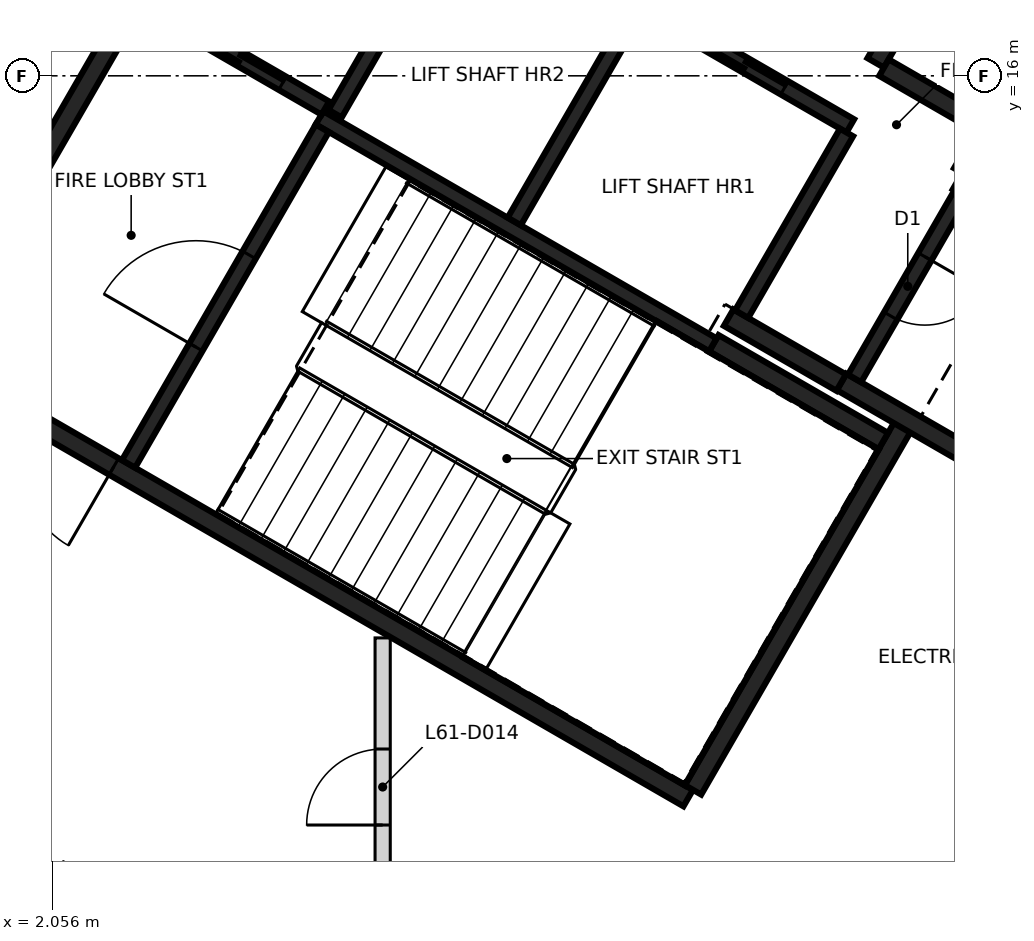
"""IFC4 building model, lengths in metres.
Left out: names, types, materials, properties, quantities, classifications, styles, units other than length and angle.
Written with IfcOpenShell. Run it as: python <this file> out.ifc"""

import sys

from ifc_helpers import new_model, si_unit, direction, frame, frame_2d, origin, place, context, subcontext, project, spatial, rectangle, extrude, element, fill, save


model = new_model("IFC4")
c1 = context("Model", 3, precision=1e-05, world=origin(), true_north=direction((0.0, 1.0)))
c2 = subcontext(c1, "Body", "Model", "MODEL_VIEW")
j1 = project(units=[si_unit("LENGTHUNIT", "METRE"), si_unit("PLANEANGLEUNIT", "RADIAN")], contexts=[c1])
p1 = place(None, origin())
s1 = spatial("IfcSite", under=j1, at=p1, CompositionType="ELEMENT")
p2 = place(p1, origin())
s2 = spatial("IfcBuilding", under=s1, at=p2, CompositionType="ELEMENT")
p3 = place(p2, frame((0.0, 0.0, 243.0)))
s3 = spatial("IfcBuildingStorey", under=s2, at=p3, CompositionType="ELEMENT", Elevation=243.0)
p4 = place(p3, frame((10.42, 6.498, 0.0), z_axis=(0.0, 0.0, 1.0), x_axis=(-0.866021906294, 0.500006057782, 0.0)))
e1 = element("IfcWall", 1, at=p4, inside=s3, PredefinedType="SHEAR", context=c2, shape_type="SweptSolid", body=[
    extrude(rectangle(XDim=11.55, YDim=0.25, at=frame_2d((5.775, 0.0))), origin(), (0.0, 0.0, 1.0), 3.25),
])
p5 = place(p4, frame((10.025, 0.0, 0.0)))
e2 = element("IfcOpeningElement", 2, at=p5, cuts=e1, PredefinedType="OPENING", context=c2, shape_type="SweptSolid", body=[
    extrude(rectangle(XDim=1.2, YDim=2.1, at=frame_2d((0.6, 1.05))), frame((0.0, 0.135, 0.0), z_axis=(0.0, -1.0, 0.0), x_axis=(1.0, 0.0, 0.0)), (0.0, 0.0, 1.0), 0.27),
])
p6 = place(p4, frame((8.725, 0.0, 0.0)))
e3 = element("IfcOpeningElement", 3, at=p6, cuts=e1, PredefinedType="OPENING", context=c2, shape_type="SweptSolid", body=[
    extrude(rectangle(XDim=1.2, YDim=2.1, at=frame_2d((0.6, 1.05))), frame((0.0, 0.135, 0.0), z_axis=(0.0, -1.0, 0.0), x_axis=(1.0, 0.0, 0.0)), (0.0, 0.0, 1.0), 0.27),
])
p7 = place(p3, frame((0.48, 12.381, 0.0), z_axis=(0.0, 0.0, 1.0), x_axis=(0.49999885962, 0.866026062182, 0.0)))
e4 = element("IfcWall", 4, at=p7, inside=s3, PredefinedType="SHEAR", context=c2, shape_type="SweptSolid", body=[
    extrude(rectangle(XDim=5.225, YDim=0.25, at=frame_2d((2.612, 0.0))), origin(), (0.0, 0.0, 1.0), 3.25),
])
p8 = place(p3, frame((13.238, 11.378, 0.0), z_axis=(0.0, 0.0, 1.0), x_axis=(-0.500008851346, -0.866020293397, 0.0)))
e5 = element("IfcWall", 5, at=p8, inside=s3, PredefinedType="SHEAR", context=c2, shape_type="SweptSolid", body=[
    extrude(rectangle(XDim=5.51, YDim=0.25, at=frame_2d((2.755, 0.0))), origin(), (0.0, 0.0, 1.0), 3.25),
])
p9 = place(p3, frame((14.918, 10.54, 0.0), z_axis=(0.0, 0.0, 1.0), x_axis=(-0.866063538972, 0.499933942099, 0.0)))
e6 = element("IfcWall", 6, at=p9, inside=s3, PredefinedType="SHEAR", context=c2, shape_type="SweptSolid", body=[
    extrude(rectangle(XDim=2.865, YDim=0.25, at=frame_2d((1.432, 0.0))), origin(), (0.0, 0.0, 1.0), 3.25),
])
p10 = place(p3, frame((13.963, 14.614, 0.0), z_axis=(0.0, 0.0, 1.0), x_axis=(0.866042235819, -0.499970844928, 0.0)))
e7 = element("IfcWall", 7, at=p10, inside=s3, PredefinedType="SHEAR", context=c2, shape_type="SweptSolid", body=[
    extrude(rectangle(XDim=2.865, YDim=0.25, at=frame_2d((1.432, 0.0))), origin(), (0.0, 0.0, 1.0), 3.25),
])
p11 = place(p3, frame((10.757, 12.481, 0.0), z_axis=(0.0, 0.0, 1.0), x_axis=(0.866022940537, -0.500004266446, 0.0)))
e8 = element("IfcWall", 8, at=p11, inside=s3, PredefinedType="SHEAR", context=c2, shape_type="SweptSolid", body=[
    extrude(rectangle(XDim=2.575, YDim=0.25, at=frame_2d((1.287, 0.0))), origin(), (0.0, 0.0, 1.0), 3.25),
])
p12 = place(p3, frame((13.819, 17.785, 0.0), z_axis=(0.0, 0.0, 1.0), x_axis=(-0.500039802285, -0.866002422705, 0.0)))
e9 = element("IfcWall", 9, at=p12, inside=s3, PredefinedType="SHEAR", context=c2, shape_type="SweptSolid", body=[
    extrude(rectangle(XDim=1.865, YDim=0.25, at=frame_2d((0.932, 0.0))), origin(), (0.0, 0.0, 1.0), 3.25),
])
p13 = place(p3, frame((12.433, 11.964, 0.0), z_axis=(0.0, 0.0, 1.0), x_axis=(-0.866038183914, 0.499977863513, 0.0)))
e10 = element("IfcWall", 10, at=p13, inside=s3, PredefinedType="SHEAR", context=c2, shape_type="SweptSolid", body=[
    extrude(rectangle(XDim=1.71, YDim=0.25, at=frame_2d((0.855, 0.0))), origin(), (0.0, 0.0, 1.0), 3.25),
])
p14 = place(p3, frame((12.995, 16.108, 0.0), z_axis=(0.0, 0.0, 1.0), x_axis=(0.866044474677, -0.49996696679, 0.0)))
e11 = element("IfcWall", 11, at=p14, inside=s3, PredefinedType="SHEAR", context=c2, shape_type="SweptSolid", body=[
    extrude(rectangle(XDim=1.584, YDim=0.25, at=frame_2d((0.792, 0.0))), origin(), (0.0, 0.0, 1.0), 3.25),
])
p15 = place(p3, frame((14.305, 15.207, 0.0), z_axis=(0.0, 0.0, 1.0), x_axis=(-0.499848422343, -0.866112899501, 0.0)))
e12 = element("IfcWall", 12, at=p15, inside=s3, PredefinedType="SHEAR", context=c2, shape_type="SweptSolid", body=[
    extrude(rectangle(XDim=0.559, YDim=0.25, at=frame_2d((0.28, 0.0))), origin(), (0.0, 0.0, 1.0), 3.25),
])
p16 = place(p3, frame((12.552, 15.342, 0.0), z_axis=(0.0, 0.0, 1.0), x_axis=(-0.866030299012, 0.499991521122, 0.0)))
e13 = element("IfcWall", 13, at=p16, inside=s3, PredefinedType="SHEAR", context=c2, shape_type="SweptSolid", body=[
    extrude(rectangle(XDim=6.1, YDim=0.2, at=frame_2d((3.05, 0.0))), origin(), (0.0, 0.0, 1.0), 3.25),
])
p17 = place(p16, frame((1.0, 0.0, 0.0)))
e14 = element("IfcOpeningElement", 14, at=p17, cuts=e13, PredefinedType="OPENING", context=c2, shape_type="SweptSolid", body=[
    extrude(rectangle(XDim=1.2, YDim=2.1, at=frame_2d((0.6, 1.05))), frame((0.0, 0.11, 0.0), z_axis=(0.0, -1.0, 0.0), x_axis=(1.0, 0.0, 0.0)), (0.0, 0.0, 1.0), 0.22),
])
p18 = place(p16, frame((3.982, 0.0, 0.0)))
e15 = element("IfcOpeningElement", 15, at=p18, cuts=e13, PredefinedType="OPENING", context=c2, shape_type="SweptSolid", body=[
    extrude(rectangle(XDim=1.2, YDim=2.1, at=frame_2d((0.6, 1.05))), frame((0.0, 0.11, 0.0), z_axis=(0.0, -1.0, 0.0), x_axis=(1.0, 0.0, 0.0)), (0.0, 0.0, 1.0), 0.22),
])
p19 = place(p3, frame((10.743, 12.46, 0.0), z_axis=(0.0, 0.0, 1.0), x_axis=(-0.866018848283, 0.500011354289, 0.0)))
e16 = element("IfcWall", 16, at=p19, inside=s3, PredefinedType="SHEAR", context=c2, shape_type="SweptSolid", body=[
    extrude(rectangle(XDim=5.974, YDim=0.2, at=frame_2d((2.987, 0.0))), origin(), (0.0, 0.0, 1.0), 3.25),
])
p20 = place(p3, frame((3.057, 10.895, 0.0), z_axis=(0.0, 0.0, 1.0), x_axis=(0.500027839223, 0.866009330205, 0.0)))
e17 = element("IfcWall", 17, at=p20, inside=s3, PredefinedType="SHEAR", context=c2, shape_type="SweptSolid", body=[
    extrude(rectangle(XDim=5.098, YDim=0.2, at=frame_2d((2.549, 0.0))), origin(), (0.0, 0.0, 1.0), 3.25),
])
p21 = place(p20, frame((1.774, 0.0, 0.0)))
e18 = element("IfcOpeningElement", 18, at=p21, cuts=e17, PredefinedType="OPENING", context=c2, shape_type="SweptSolid", body=[
    extrude(rectangle(XDim=1.4, YDim=2.1, at=frame_2d((0.7, 1.05))), frame((0.0, 0.11, 0.0), z_axis=(0.0, -1.0, 0.0), x_axis=(1.0, 0.0, 0.0)), (0.0, 0.0, 1.0), 0.22),
])
p22 = place(p3, frame((8.132, 14.084, 0.0), z_axis=(0.0, 0.0, 1.0), x_axis=(0.500030834389, 0.86600760081, 0.0)))
e19 = element("IfcWall", 19, at=p22, inside=s3, PredefinedType="SHEAR", context=c2, shape_type="SweptSolid", body=[
    extrude(rectangle(XDim=3.198, YDim=0.2, at=frame_2d((1.599, 0.0))), origin(), (0.0, 0.0, 1.0), 3.25),
])
p23 = place(p3, frame((14.008, 14.442, 0.0), z_axis=(0.0, 0.0, 1.0), x_axis=(-0.499986818241, -0.866033014143, 0.0)))
e20 = element("IfcWall", 20, at=p23, inside=s3, PredefinedType="SHEAR", context=c2, shape_type="SweptSolid", body=[
    extrude(rectangle(XDim=2.798, YDim=0.2, at=frame_2d((1.399, 0.0))), origin(), (0.0, 0.0, 1.0), 3.25),
])
p24 = place(p23, frame((0.949, 0.0, 0.0)))
e21 = element("IfcOpeningElement", 21, at=p24, cuts=e20, PredefinedType="OPENING", context=c2, shape_type="SweptSolid", body=[
    extrude(rectangle(XDim=0.9, YDim=2.1, at=frame_2d((0.45, 1.05))), frame((0.0, 0.11, 0.0), z_axis=(0.0, -1.0, 0.0), x_axis=(1.0, 0.0, 0.0)), (0.0, 0.0, 1.0), 0.22),
])
p25 = place(p3, frame((12.502, 15.255, 0.0), z_axis=(0.0, 0.0, 1.0), x_axis=(-0.499965018551, -0.866045599391, 0.0)))
e22 = element("IfcWall", 22, at=p25, inside=s3, PredefinedType="SHEAR", context=c2, shape_type="SweptSolid", body=[
    extrude(rectangle(XDim=2.759, YDim=0.2, at=frame_2d((1.379, 0.0))), origin(), (0.0, 0.0, 1.0), 3.25),
])
p26 = place(p3, frame((7.324, 18.187, 0.0), z_axis=(0.0, 0.0, 1.0), x_axis=(-0.499967891604, -0.866043940782, 0.0)))
e23 = element("IfcWall", 23, at=p26, inside=s3, PredefinedType="SHEAR", context=c2, shape_type="SweptSolid", body=[
    extrude(rectangle(XDim=3.1, YDim=0.2, at=frame_2d((1.55, 0.0))), origin(), (0.0, 0.0, 1.0), 3.25),
])
p27 = place(p3, frame((5.646, 15.576, 0.0), z_axis=(0.0, 0.0, 1.0), x_axis=(-0.866018407898, 0.500012117035, 0.0)))
e24 = element("IfcWall", 24, at=p27, inside=s3, PredefinedType="SHEAR", context=c2, shape_type="SweptSolid", body=[
    extrude(rectangle(XDim=2.651, YDim=0.2, at=frame_2d((1.325, 0.0))), origin(), (0.0, 0.0, 1.0), 3.25),
])
p28 = place(p27, frame((0.652, 0.0, 0.0)))
e25 = element("IfcOpeningElement", 25, at=p28, cuts=e24, PredefinedType="OPENING", context=c2, shape_type="SweptSolid", body=[
    extrude(rectangle(XDim=1.3, YDim=2.1, at=frame_2d((0.65, 1.05))), frame((0.0, 0.11, 0.0), z_axis=(0.0, -1.0, 0.0), x_axis=(1.0, 0.0, 0.0)), (0.0, 0.0, 1.0), 0.22),
])
p29 = place(p3, frame((-1.086, 12.651, 0.0), z_axis=(0.0, 0.0, 1.0), x_axis=(0.492590234691, 0.870261374925, 0.0)))
e26 = element("IfcWall", 26, at=p29, inside=s3, PredefinedType="PARTITIONING", context=c2, shape_type="SweptSolid", body=[
    extrude(rectangle(XDim=8.738, YDim=0.2, at=frame_2d((4.369, 0.0))), origin(), (0.0, 0.0, 1.0), 3.25),
])
p30 = place(p29, frame((6.105, 0.0, 0.0)))
e27 = element("IfcOpeningElement", 27, at=p30, cuts=e26, PredefinedType="OPENING", context=c2, shape_type="SweptSolid", body=[
    extrude(rectangle(XDim=1.0, YDim=2.1, at=frame_2d((0.5, 1.05))), frame((0.0, 0.11, 0.0), z_axis=(0.0, -1.0, 0.0), x_axis=(1.0, 0.0, 0.0)), (0.0, 0.0, 1.0), 0.22),
])
p31 = place(p29, frame((3.25, 0.0, 0.0)))
e28 = element("IfcOpeningElement", 28, at=p31, cuts=e26, PredefinedType="OPENING", context=c2, shape_type="SweptSolid", body=[
    extrude(rectangle(XDim=0.95, YDim=2.1, at=frame_2d((0.475, 1.05))), frame((0.0, 0.11, 0.0), z_axis=(0.0, -1.0, 0.0), x_axis=(1.0, 0.0, 0.0)), (0.0, 0.0, 1.0), 0.22),
])
p32 = place(p3, frame((6.4, -4.721, 0.0), z_axis=(0.0, 0.0, 1.0), x_axis=(0.0, 1.0, 0.0)))
e29 = element("IfcWall", 29, at=p32, inside=s3, PredefinedType="PARTITIONING", context=c2, shape_type="SweptSolid", body=[
    extrude(rectangle(XDim=13.326, YDim=0.2, at=frame_2d((6.663, 0.0))), origin(), (0.0, 0.0, 1.0), 3.25),
])
p33 = place(p32, frame((4.021, 0.0, 0.0)))
e30 = element("IfcOpeningElement", 30, at=p33, cuts=e29, PredefinedType="OPENING", context=c2, shape_type="SweptSolid", body=[
    extrude(rectangle(XDim=1.4, YDim=2.1, at=frame_2d((0.7, 1.05))), frame((0.0, 0.11, 0.0), z_axis=(0.0, -1.0, 0.0), x_axis=(1.0, 0.0, 0.0)), (0.0, 0.0, 1.0), 0.22),
])
p34 = place(p32, frame((10.865, 0.0, 0.0)))
e31 = element("IfcOpeningElement", 31, at=p34, cuts=e29, PredefinedType="OPENING", context=c2, shape_type="SweptSolid", body=[
    extrude(rectangle(XDim=1.0, YDim=2.1, at=frame_2d((0.5, 1.05))), frame((0.0, 0.11, 0.0), z_axis=(0.0, -1.0, 0.0), x_axis=(1.0, 0.0, 0.0)), (0.0, 0.0, 1.0), 0.22),
])
p35 = place(p28, origin())
e32 = element("IfcDoor", 32, at=p35, inside=s3, OperationType="SLIDING_TO_RIGHT", PredefinedType="DOOR", context=c2, shape_type="SweptSolid", body=[
    extrude(rectangle(XDim=1.3, YDim=2.1, at=frame_2d((0.65, 1.05))), frame((0.0, 0.025, 0.0), z_axis=(0.0, -1.0, 0.0), x_axis=(1.0, 0.0, 0.0)), (0.0, 0.0, 1.0), 0.05),
])
fill(e25, e32)
p36 = place(p17, origin())
e33 = element("IfcDoor", 33, at=p36, inside=s3, OperationType="DOUBLE_DOOR_SLIDING", PredefinedType="DOOR", context=c2, shape_type="SweptSolid", body=[
    extrude(rectangle(XDim=1.2, YDim=2.1, at=frame_2d((0.6, 1.05))), frame((0.0, 0.025, 0.0), z_axis=(0.0, -1.0, 0.0), x_axis=(1.0, 0.0, 0.0)), (0.0, 0.0, 1.0), 0.05),
])
fill(e14, e33)
p37 = place(p6, origin())
e34 = element("IfcDoor", 34, at=p37, inside=s3, OperationType="SINGLE_SWING_RIGHT", PredefinedType="DOOR", context=c2, shape_type="SweptSolid", body=[
    extrude(rectangle(XDim=1.2, YDim=2.1, at=frame_2d((0.6, 1.05))), frame((0.0, 0.025, 0.0), z_axis=(0.0, -1.0, 0.0), x_axis=(1.0, 0.0, 0.0)), (0.0, 0.0, 1.0), 0.05),
])
fill(e3, e34)
p38 = place(p21, origin())
e35 = element("IfcDoor", 35, at=p38, inside=s3, OperationType="SINGLE_SWING_RIGHT", PredefinedType="DOOR", context=c2, shape_type="SweptSolid", body=[
    extrude(rectangle(XDim=1.4, YDim=2.1, at=frame_2d((0.7, 1.05))), frame((0.0, 0.025, 0.0), z_axis=(0.0, -1.0, 0.0), x_axis=(1.0, 0.0, 0.0)), (0.0, 0.0, 1.0), 0.05),
])
fill(e18, e35)
p39 = place(p24, origin())
e36 = element("IfcDoor", 36, at=p39, inside=s3, OperationType="SINGLE_SWING_LEFT", PredefinedType="DOOR", context=c2, shape_type="SweptSolid", body=[
    extrude(rectangle(XDim=0.9, YDim=2.1, at=frame_2d((0.45, 1.05))), frame((0.0, 0.025, 0.0), z_axis=(0.0, -1.0, 0.0), x_axis=(1.0, 0.0, 0.0)), (0.0, 0.0, 1.0), 0.05),
])
fill(e21, e36)
p40 = place(p34, frame((1.0, 0.0, 0.0), z_axis=(0.0, 0.0, 1.0), x_axis=(-1.0, 0.0, 0.0)))
e37 = element("IfcDoor", 37, at=p40, inside=s3, OperationType="SINGLE_SWING_LEFT", PredefinedType="DOOR", context=c2, shape_type="SweptSolid", body=[
    extrude(rectangle(XDim=1.0, YDim=2.1, at=frame_2d((0.5, 1.05))), frame((0.0, 0.025, 0.0), z_axis=(0.0, -1.0, 0.0), x_axis=(1.0, 0.0, 0.0)), (0.0, 0.0, 1.0), 0.05),
])
fill(e31, e37)
save(model, sys.argv[1])
